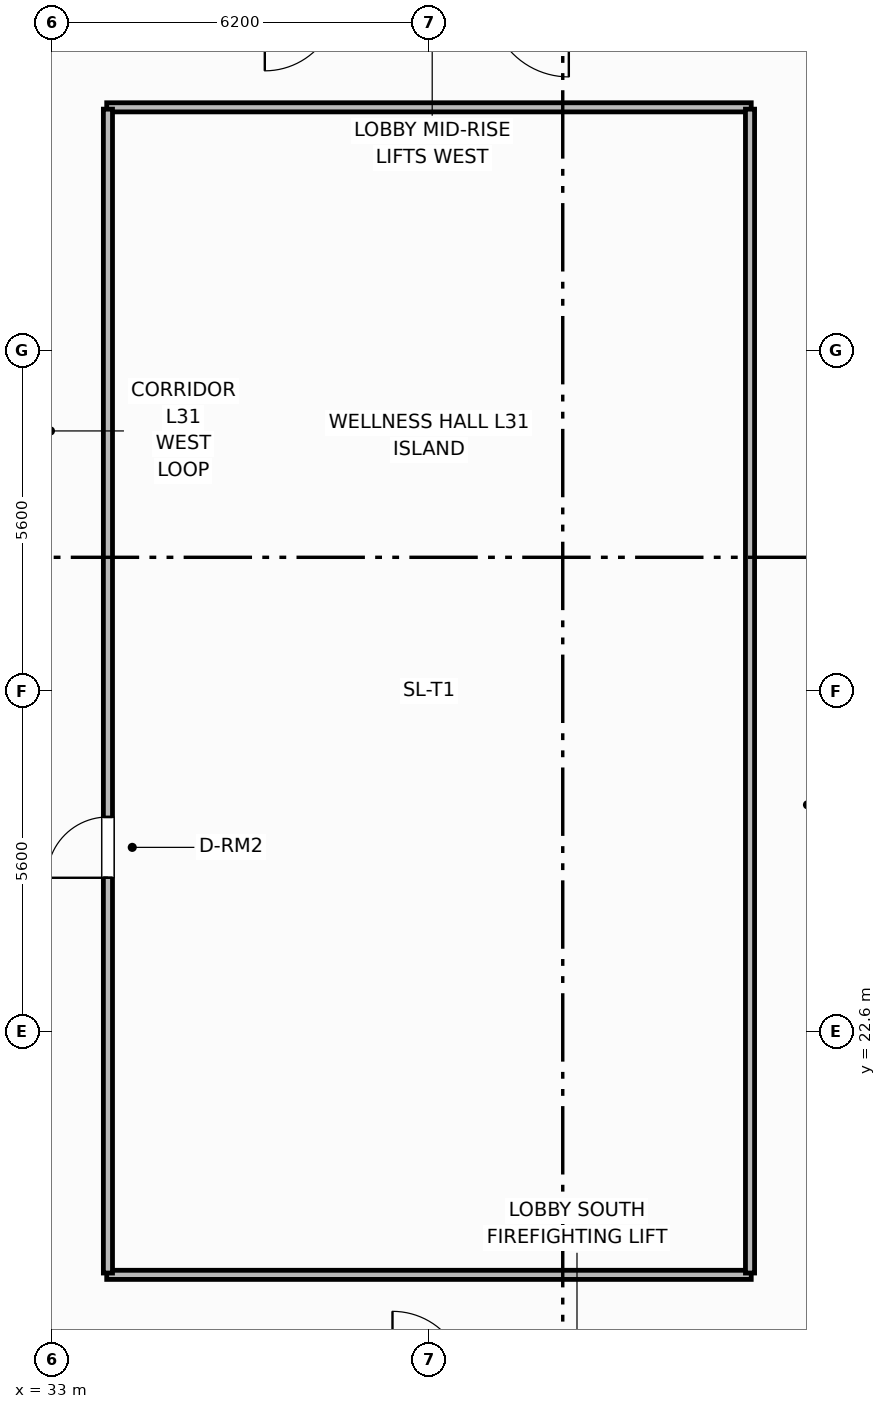
"""IFC4 building model, lengths in metres.
Left out: names, types, materials, properties, quantities, classifications, styles, units other than length and angle.
Written with IfcOpenShell. Run it as: python <this file> out.ifc"""

import sys

from ifc_helpers import new_model, si_unit, direction, frame, frame_2d, origin, place, context, subcontext, project, spatial, rectangle, extrude, element, fill, save


model = new_model("IFC4")
c1 = context("Model", 3, precision=1e-05, world=origin(), true_north=direction((0.0, 1.0)))
c2 = subcontext(c1, "Body", "Model", "MODEL_VIEW")
j1 = project(units=[si_unit("LENGTHUNIT", "METRE"), si_unit("PLANEANGLEUNIT", "RADIAN")], contexts=[c1])
p1 = place(None, origin())
s1 = spatial("IfcSite", under=j1, at=p1, CompositionType="ELEMENT")
p2 = place(p1, origin())
s2 = spatial("IfcBuilding", under=s1, at=p2, CompositionType="ELEMENT")
p3 = place(p2, frame((0.0, 0.0, 125.3)))
s3 = spatial("IfcBuildingStorey", under=s2, at=p3, CompositionType="ELEMENT", Elevation=125.3)
for number, where, z_axis, x_axis in (
    (1, (33.9, 18.6, 0.0), (0.0, 0.0, 1.0), (1.0, 0.0, 0.0)),
    (2, (33.9, 37.8, 0.0), (0.0, 0.0, 1.0), (1.0, 0.0, 0.0)),
):
    element("IfcWall", number, at=place(p3, frame(where, z_axis=z_axis, x_axis=x_axis)), inside=s3, PredefinedType="PARTITIONING", context=c2, shape_type="SweptSolid", body=[
        extrude(rectangle(XDim=10.6, YDim=0.15, at=frame_2d((5.3, 0.0))), origin(), (0.0, 0.0, 1.0), 2.53),
    ])
p4 = place(p3, frame((33.92, 18.63, 0.0), z_axis=(0.0, 0.0, 1.0), x_axis=(0.0, 1.0, 0.0)))
e3 = element("IfcWall", 3, at=p4, inside=s3, PredefinedType="PARTITIONING", context=c2, shape_type="SweptSolid", body=[
    extrude(rectangle(XDim=19.14, YDim=0.15, at=frame_2d((9.57, 0.0))), origin(), (0.0, 0.0, 1.0), 2.53),
])
p5 = place(p4, frame((6.5, 0.0, 0.0)))
e4 = element("IfcOpeningElement", 4, at=p5, cuts=e3, PredefinedType="OPENING", context=c2, shape_type="SweptSolid", body=[
    extrude(rectangle(XDim=1.0, YDim=2.15, at=frame_2d((0.5, 1.075))), frame((0.0, 0.085, 0.0), z_axis=(0.0, -1.0, 0.0), x_axis=(1.0, 0.0, 0.0)), (0.0, 0.0, 1.0), 0.17),
])
p6 = place(p3, frame((44.48, 18.63, 0.0), z_axis=(0.0, 0.0, 1.0), x_axis=(0.0, 1.0, 0.0)))
e5 = element("IfcWall", 5, at=p6, inside=s3, PredefinedType="PARTITIONING", context=c2, shape_type="SweptSolid", body=[
    extrude(rectangle(XDim=19.14, YDim=0.15, at=frame_2d((9.57, 0.0))), origin(), (0.0, 0.0, 1.0), 2.53),
])
p7 = place(p5, origin())
e6 = element("IfcDoor", 6, at=p7, inside=s3, OperationType="SINGLE_SWING_LEFT", PredefinedType="DOOR", context=c2, shape_type="SweptSolid", body=[
    extrude(rectangle(XDim=1.0, YDim=2.15, at=frame_2d((0.5, 1.075))), frame((0.0, 0.025, 0.0), z_axis=(0.0, -1.0, 0.0), x_axis=(1.0, 0.0, 0.0)), (0.0, 0.0, 1.0), 0.05),
])
fill(e4, e6)
save(model, sys.argv[1])
